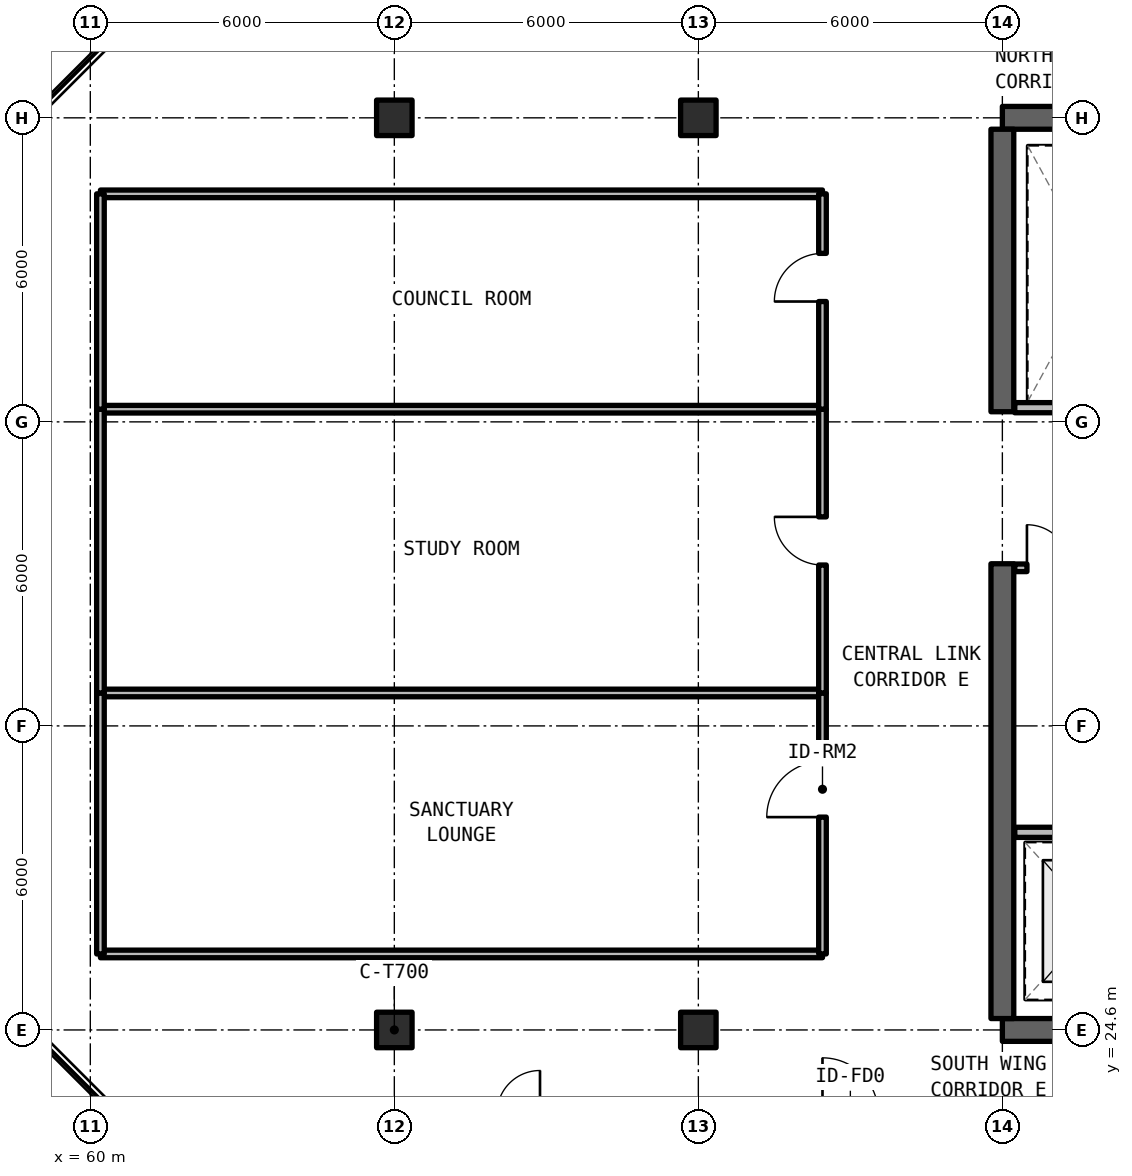
"""IFC4 building model, lengths in metres.
Left out: names, types, materials, properties, quantities, classifications, styles, units other than length and angle.
Written with IfcOpenShell. Run it as: python <this file> out.ifc"""

import sys

from ifc_helpers import new_model, si_unit, direction, frame, frame_2d, origin, origin_2d, place, context, subcontext, project, spatial, rectangle, extrude, element, fill, save


model = new_model("IFC4")
c1 = context("Model", 3, precision=1e-05, world=origin(), true_north=direction((0.0, 1.0)))
c2 = subcontext(c1, "Body", "Model", "MODEL_VIEW")
j1 = project(units=[si_unit("LENGTHUNIT", "METRE"), si_unit("PLANEANGLEUNIT", "RADIAN")], contexts=[c1])
p1 = place(None, origin())
s1 = spatial("IfcSite", under=j1, at=p1, CompositionType="ELEMENT")
p2 = place(p1, origin())
s2 = spatial("IfcBuilding", under=s1, at=p2, CompositionType="ELEMENT")
p3 = place(p2, frame((0.0, 0.0, 232.65)))
s3 = spatial("IfcBuildingStorey", under=s2, at=p3, CompositionType="ELEMENT", Elevation=232.65)
for number, where, z_axis, x_axis in (
    (1, (78.0, 24.6, 0.0), (0.0, 0.0, 1.0), (1.0, 0.0, 0.0)),
    (2, (90.0, 42.6, 0.0), (0.0, 0.0, 1.0), (-1.0, 0.0, 0.0)),
):
    element("IfcWall", number, at=place(p3, frame(where, z_axis=z_axis, x_axis=x_axis)), inside=s3, PredefinedType="SHEAR", context=c2, shape_type="SweptSolid", body=[
        extrude(rectangle(XDim=12.0, YDim=0.45, at=frame_2d((6.0, 0.0))), origin(), (0.0, 0.0, 1.0), 3.3),
    ])
p4 = place(p3, frame((78.0, 24.825, 0.0), z_axis=(0.0, 0.0, 1.0), x_axis=(0.0, 1.0, 0.0)))
e3 = element("IfcWall", 3, at=p4, inside=s3, PredefinedType="SHEAR", context=c2, shape_type="SweptSolid", body=[
    extrude(rectangle(XDim=8.975, YDim=0.45, at=frame_2d((4.488, 0.0))), origin(), (0.0, 0.0, 1.0), 3.3),
])
p5 = place(p3, frame((78.0, 36.8, 0.0), z_axis=(0.0, 0.0, 1.0), x_axis=(0.0, 1.0, 0.0)))
e4 = element("IfcWall", 4, at=p5, inside=s3, PredefinedType="SHEAR", context=c2, shape_type="SweptSolid", body=[
    extrude(rectangle(XDim=5.575, YDim=0.45, at=frame_2d((2.788, 0.0))), origin(), (0.0, 0.0, 1.0), 3.3),
])
for number, where, z_axis, x_axis in (
    (5, (66.0, 24.6, 0.0), (0.0, 0.0, 1.0), (1.0, 0.0, 0.0)),
    (6, (66.0, 42.6, 0.0), (0.0, 0.0, 1.0), (1.0, 0.0, 0.0)),
    (7, (72.0, 24.6, 0.0), (0.0, 0.0, 1.0), (1.0, 0.0, 0.0)),
    (8, (72.0, 42.6, 0.0), (0.0, 0.0, 1.0), (1.0, 0.0, 0.0)),
):
    element("IfcColumn", number, at=place(p3, frame(where, z_axis=z_axis, x_axis=x_axis)), inside=s3, PredefinedType="COLUMN", context=c2, shape_type="SweptSolid", body=[
        extrude(rectangle(XDim=0.7, YDim=0.7, at=origin_2d()), origin(), (0.0, 0.0, 1.0), 3.3),
    ])
p6 = place(p3, frame((78.245, 28.5, 0.0), z_axis=(0.0, 0.0, 1.0), x_axis=(1.0, 0.0, 0.0)))
e9 = element("IfcWall", 9, at=p6, inside=s3, PredefinedType="SOLIDWALL", context=c2, shape_type="SweptSolid", body=[
    extrude(rectangle(XDim=7.585, YDim=0.2, at=frame_2d((3.792, 0.0))), origin(), (0.0, 0.0, 1.0), 2.35),
])
p7 = place(p6, frame((3.555, 0.0, 0.0)))
e10 = element("IfcOpeningElement", 10, at=p7, cuts=e9, PredefinedType="OPENING", context=c2, shape_type="SweptSolid", body=[
    extrude(rectangle(XDim=1.0, YDim=2.15, at=frame_2d((0.5, 1.075))), frame((0.0, 0.11, 0.0), z_axis=(0.0, -1.0, 0.0), x_axis=(1.0, 0.0, 0.0)), (0.0, 0.0, 1.0), 0.22),
])
p8 = place(p3, frame((78.245, 33.72, 0.0), z_axis=(0.0, 0.0, 1.0), x_axis=(1.0, 0.0, 0.0)))
e11 = element("IfcWall", 11, at=p8, inside=s3, PredefinedType="SOLIDWALL", context=c2, shape_type="SweptSolid", body=[
    extrude(rectangle(XDim=1.395, YDim=0.15, at=frame_2d((0.697, 0.0))), origin(), (0.0, 0.0, 1.0), 2.35),
])
p9 = place(p8, frame((0.24, 0.0, 0.0)))
e12 = element("IfcOpeningElement", 12, at=p9, cuts=e11, PredefinedType="OPENING", context=c2, shape_type="SweptSolid", body=[
    extrude(rectangle(XDim=0.85, YDim=2.1, at=frame_2d((0.425, 1.05))), frame((0.0, 0.085, 0.0), z_axis=(0.0, -1.0, 0.0), x_axis=(1.0, 0.0, 0.0)), (0.0, 0.0, 1.0), 0.17),
])
p10 = place(p3, frame((78.245, 36.88, 0.0), z_axis=(0.0, 0.0, 1.0), x_axis=(1.0, 0.0, 0.0)))
e13 = element("IfcWall", 13, at=p10, inside=s3, PredefinedType="SOLIDWALL", context=c2, shape_type="SweptSolid", body=[
    extrude(rectangle(XDim=3.075, YDim=0.2, at=frame_2d((1.538, 0.0))), origin(), (0.0, 0.0, 1.0), 2.35),
])
for number, where, z_axis, x_axis in (
    (14, (60.2, 26.1, 0.0), (0.0, 0.0, 1.0), (1.0, 0.0, 0.0)),
    (15, (60.2, 31.25, 0.0), (0.0, 0.0, 1.0), (1.0, 0.0, 0.0)),
):
    element("IfcWall", number, at=place(p3, frame(where, z_axis=z_axis, x_axis=x_axis)), inside=s3, PredefinedType="SOLIDWALL", context=c2, shape_type="SweptSolid", body=[
        extrude(rectangle(XDim=14.25, YDim=0.15, at=frame_2d((7.125, 0.0))), origin(), (0.0, 0.0, 1.0), 2.35),
    ])
p11 = place(p3, frame((60.2, 26.1, 0.0), z_axis=(0.0, 0.0, 1.0), x_axis=(0.0, 1.0, 0.0)))
e16 = element("IfcWall", 16, at=p11, inside=s3, PredefinedType="SOLIDWALL", context=c2, shape_type="SweptSolid", body=[
    extrude(rectangle(XDim=5.15, YDim=0.15, at=frame_2d((2.575, 0.0))), origin(), (0.0, 0.0, 1.0), 2.35),
])
p12 = place(p3, frame((74.45, 26.1, 0.0), z_axis=(0.0, 0.0, 1.0), x_axis=(0.0, 1.0, 0.0)))
e17 = element("IfcWall", 17, at=p12, inside=s3, PredefinedType="SOLIDWALL", context=c2, shape_type="SweptSolid", body=[
    extrude(rectangle(XDim=5.15, YDim=0.15, at=frame_2d((2.575, 0.0))), origin(), (0.0, 0.0, 1.0), 2.35),
])
p13 = place(p12, frame((2.7, 0.0, 0.0)))
e18 = element("IfcOpeningElement", 18, at=p13, cuts=e17, PredefinedType="OPENING", context=c2, shape_type="SweptSolid", body=[
    extrude(rectangle(XDim=1.1, YDim=2.15, at=frame_2d((0.55, 1.075))), frame((0.0, 0.085, 0.0), z_axis=(0.0, -1.0, 0.0), x_axis=(1.0, 0.0, 0.0)), (0.0, 0.0, 1.0), 0.17),
])
p14 = place(p3, frame((60.2, 36.85, 0.0), z_axis=(0.0, 0.0, 1.0), x_axis=(1.0, 0.0, 0.0)))
e19 = element("IfcWall", 19, at=p14, inside=s3, PredefinedType="SOLIDWALL", context=c2, shape_type="SweptSolid", body=[
    extrude(rectangle(XDim=14.25, YDim=0.15, at=frame_2d((7.125, 0.0))), origin(), (0.0, 0.0, 1.0), 2.35),
])
p15 = place(p3, frame((60.2, 31.25, 0.0), z_axis=(0.0, 0.0, 1.0), x_axis=(0.0, 1.0, 0.0)))
e20 = element("IfcWall", 20, at=p15, inside=s3, PredefinedType="SOLIDWALL", context=c2, shape_type="SweptSolid", body=[
    extrude(rectangle(XDim=5.6, YDim=0.15, at=frame_2d((2.8, 0.0))), origin(), (0.0, 0.0, 1.0), 2.35),
])
p16 = place(p3, frame((74.45, 31.25, 0.0), z_axis=(0.0, 0.0, 1.0), x_axis=(0.0, 1.0, 0.0)))
e21 = element("IfcWall", 21, at=p16, inside=s3, PredefinedType="SOLIDWALL", context=c2, shape_type="SweptSolid", body=[
    extrude(rectangle(XDim=5.6, YDim=0.15, at=frame_2d((2.8, 0.0))), origin(), (0.0, 0.0, 1.0), 2.35),
])
p17 = place(p16, frame((2.525, 0.0, 0.0)))
e22 = element("IfcOpeningElement", 22, at=p17, cuts=e21, PredefinedType="OPENING", context=c2, shape_type="SweptSolid", body=[
    extrude(rectangle(XDim=0.95, YDim=2.15, at=frame_2d((0.475, 1.075))), frame((0.0, 0.085, 0.0), z_axis=(0.0, -1.0, 0.0), x_axis=(1.0, 0.0, 0.0)), (0.0, 0.0, 1.0), 0.17),
])
p18 = place(p3, frame((60.2, 41.1, 0.0), z_axis=(0.0, 0.0, 1.0), x_axis=(1.0, 0.0, 0.0)))
e23 = element("IfcWall", 23, at=p18, inside=s3, PredefinedType="SOLIDWALL", context=c2, shape_type="SweptSolid", body=[
    extrude(rectangle(XDim=14.25, YDim=0.15, at=frame_2d((7.125, 0.0))), origin(), (0.0, 0.0, 1.0), 2.35),
])
p19 = place(p3, frame((60.2, 36.85, 0.0), z_axis=(0.0, 0.0, 1.0), x_axis=(0.0, 1.0, 0.0)))
e24 = element("IfcWall", 24, at=p19, inside=s3, PredefinedType="SOLIDWALL", context=c2, shape_type="SweptSolid", body=[
    extrude(rectangle(XDim=4.25, YDim=0.15, at=frame_2d((2.125, 0.0))), origin(), (0.0, 0.0, 1.0), 2.35),
])
p20 = place(p3, frame((74.45, 36.85, 0.0), z_axis=(0.0, 0.0, 1.0), x_axis=(0.0, 1.0, 0.0)))
e25 = element("IfcWall", 25, at=p20, inside=s3, PredefinedType="SOLIDWALL", context=c2, shape_type="SweptSolid", body=[
    extrude(rectangle(XDim=4.25, YDim=0.15, at=frame_2d((2.125, 0.0))), origin(), (0.0, 0.0, 1.0), 2.35),
])
p21 = place(p20, frame((2.125, 0.0, 0.0)))
e26 = element("IfcOpeningElement", 26, at=p21, cuts=e25, PredefinedType="OPENING", context=c2, shape_type="SweptSolid", body=[
    extrude(rectangle(XDim=0.95, YDim=2.15, at=frame_2d((0.475, 1.075))), frame((0.0, 0.085, 0.0), z_axis=(0.0, -1.0, 0.0), x_axis=(1.0, 0.0, 0.0)), (0.0, 0.0, 1.0), 0.17),
])
p22 = place(p9, origin())
e27 = element("IfcDoor", 27, at=p22, inside=s3, OperationType="SINGLE_SWING_LEFT", PredefinedType="DOOR", context=c2, shape_type="SweptSolid", body=[
    extrude(rectangle(XDim=0.85, YDim=2.1, at=frame_2d((0.425, 1.05))), frame((0.0, 0.025, 0.0), z_axis=(0.0, -1.0, 0.0), x_axis=(1.0, 0.0, 0.0)), (0.0, 0.0, 1.0), 0.05),
])
fill(e12, e27)
p23 = place(p13, origin())
e28 = element("IfcDoor", 28, at=p23, inside=s3, OperationType="SINGLE_SWING_LEFT", PredefinedType="DOOR", context=c2, shape_type="SweptSolid", body=[
    extrude(rectangle(XDim=1.1, YDim=2.15, at=frame_2d((0.55, 1.075))), frame((0.0, 0.025, 0.0), z_axis=(0.0, -1.0, 0.0), x_axis=(1.0, 0.0, 0.0)), (0.0, 0.0, 1.0), 0.05),
])
fill(e18, e28)
p24 = place(p17, origin())
e29 = element("IfcDoor", 29, at=p24, inside=s3, OperationType="SINGLE_SWING_RIGHT", PredefinedType="DOOR", context=c2, shape_type="SweptSolid", body=[
    extrude(rectangle(XDim=0.95, YDim=2.15, at=frame_2d((0.475, 1.075))), frame((0.0, 0.025, 0.0), z_axis=(0.0, -1.0, 0.0), x_axis=(1.0, 0.0, 0.0)), (0.0, 0.0, 1.0), 0.05),
])
fill(e22, e29)
p25 = place(p21, origin())
e30 = element("IfcDoor", 30, at=p25, inside=s3, OperationType="SINGLE_SWING_LEFT", PredefinedType="DOOR", context=c2, shape_type="SweptSolid", body=[
    extrude(rectangle(XDim=0.95, YDim=2.15, at=frame_2d((0.475, 1.075))), frame((0.0, 0.025, 0.0), z_axis=(0.0, -1.0, 0.0), x_axis=(1.0, 0.0, 0.0)), (0.0, 0.0, 1.0), 0.05),
])
fill(e26, e30)
save(model, sys.argv[1])
